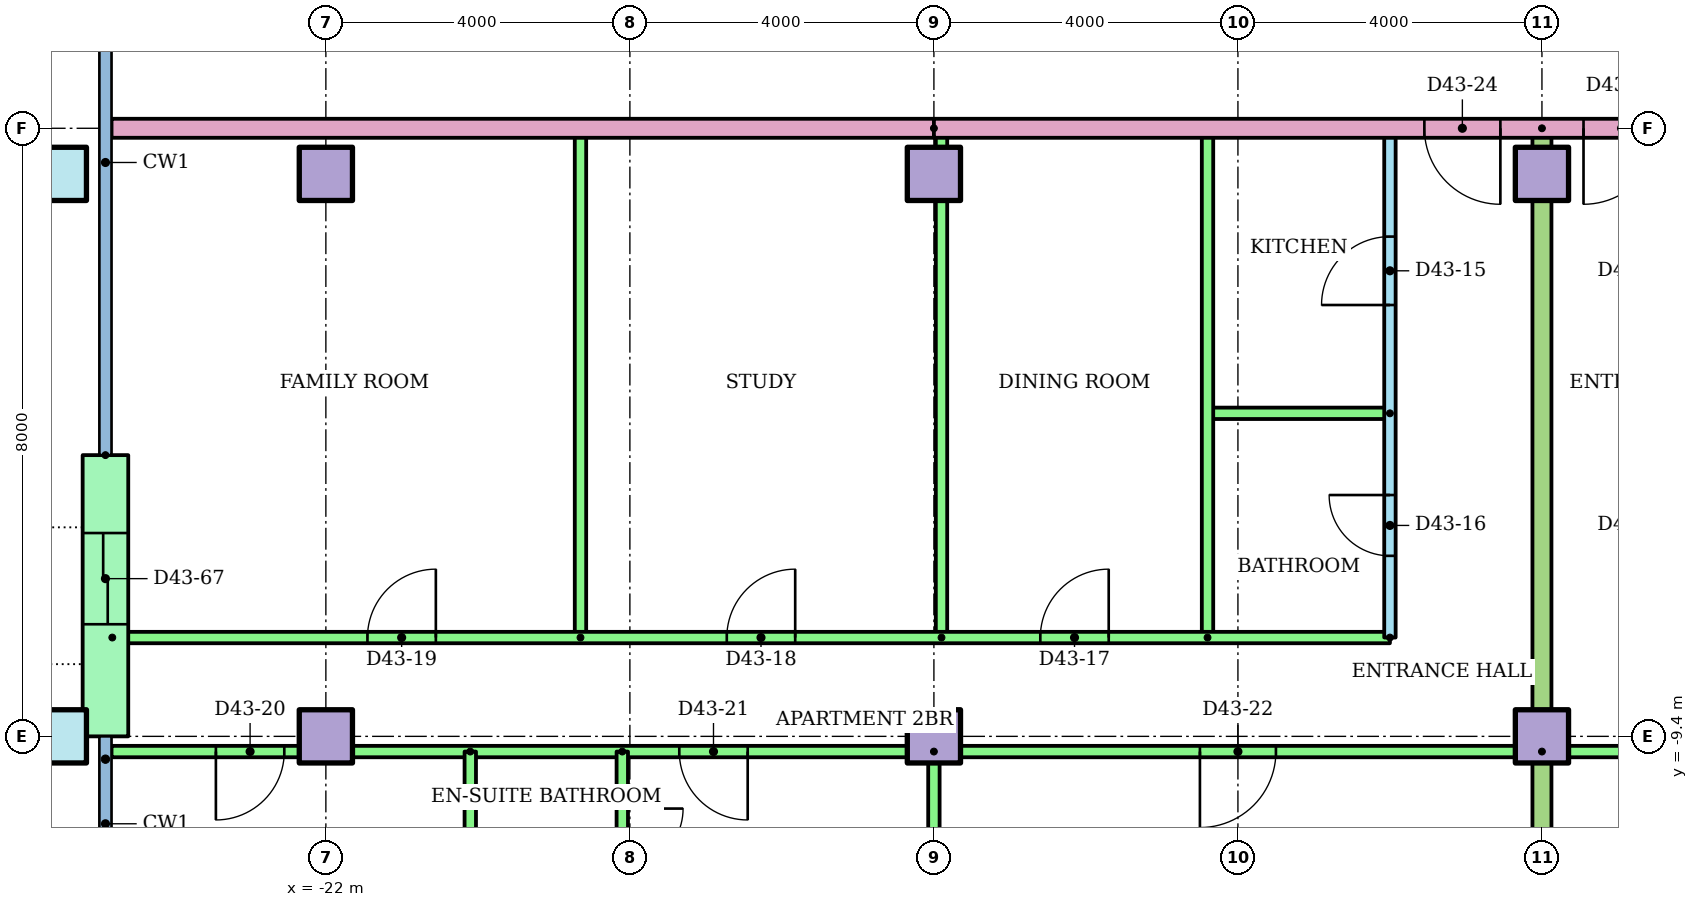
"""IFC4 building model, lengths in metres.
Left out: names, types, materials, properties, quantities, classifications, styles, units other than length and angle.
Written with IfcOpenShell. Run it as: python <this file> out.ifc"""

import sys

from ifc_helpers import new_model, si_unit, direction, frame, frame_2d, origin, origin_2d, place, context, subcontext, project, spatial, rectangle, hollow_rectangle, extrude, element, fill, save


model = new_model("IFC4")
c1 = context("Model", 3, precision=1e-05, world=origin(), true_north=direction((0.0, 1.0)))
c2 = subcontext(c1, "Body", "Model", "MODEL_VIEW")
j1 = project(units=[si_unit("LENGTHUNIT", "METRE"), si_unit("PLANEANGLEUNIT", "RADIAN")], contexts=[c1])
p1 = place(None, origin())
s1 = spatial("IfcSite", under=j1, at=p1, CompositionType="ELEMENT")
p2 = place(p1, origin())
s2 = spatial("IfcBuilding", under=s1, at=p2, CompositionType="ELEMENT")
p3 = place(p2, frame((0.0, 0.0, 168.5)))
s3 = spatial("IfcBuildingStorey", under=s2, at=p3, CompositionType="ELEMENT", Elevation=168.5)
p4 = place(p3, frame((-25.5, -9.4, 0.0)))
e1 = element("IfcColumn", 1, at=p4, inside=s3, PredefinedType="COLUMN", context=c2, shape_type="SweptSolid", body=[
    extrude(hollow_rectangle(XDim=0.7, YDim=0.7, WallThickness=0.036, at=origin_2d()), origin(), (0.0, 0.0, 1.0), 3.2),
])
for number, where in (
    (2, (-22.0, -9.4, 0.0)),
    (3, (-14.0, -9.4, 0.0)),
    (4, (-6.0, -9.4, 0.0)),
):
    element("IfcColumn", number, at=place(p3, frame(where)), inside=s3, PredefinedType="COLUMN", context=c2, shape_type="SweptSolid", body=[
        extrude(rectangle(XDim=0.7, YDim=0.7, at=origin_2d()), origin(), (0.0, 0.0, 1.0), 3.2),
    ])
p5 = place(p3, frame((-25.5, -2.0, 0.0)))
e5 = element("IfcColumn", 5, at=p5, inside=s3, PredefinedType="COLUMN", context=c2, shape_type="SweptSolid", body=[
    extrude(hollow_rectangle(XDim=0.7, YDim=0.7, WallThickness=0.036, at=origin_2d()), origin(), (0.0, 0.0, 1.0), 3.2),
])
for number, where in (
    (6, (-22.0, -2.0, 0.0)),
    (7, (-14.0, -2.0, 0.0)),
    (8, (-6.0, -2.0, 0.0)),
):
    element("IfcColumn", number, at=place(p3, frame(where)), inside=s3, PredefinedType="COLUMN", context=c2, shape_type="SweptSolid", body=[
        extrude(rectangle(XDim=0.7, YDim=0.7, at=origin_2d()), origin(), (0.0, 0.0, 1.0), 3.2),
    ])
p6 = place(p3, frame((-24.9, -5.7, 0.0), z_axis=(0.0, 0.0, 1.0), x_axis=(0.0, -1.0, 0.0)))
e9 = element("IfcWall", 9, at=p6, inside=s3, PredefinedType="STANDARD", context=c2, shape_type="SweptSolid", body=[
    extrude(rectangle(XDim=3.7, YDim=0.6, at=frame_2d((1.85, 0.0))), origin(), (0.0, 0.0, 1.0), 2.92),
])
p7 = place(p6, frame((1.025, 0.0, 0.0)))
e10 = element("IfcOpeningElement", 10, at=p7, cuts=e9, PredefinedType="OPENING", context=c2, shape_type="SweptSolid", body=[
    extrude(rectangle(XDim=1.2, YDim=2.1, at=frame_2d((0.6, 1.05))), frame((0.0, 0.31, 0.0), z_axis=(0.0, -1.0, 0.0), x_axis=(1.0, 0.0, 0.0)), (0.0, 0.0, 1.0), 0.62),
])
p8 = place(p3, frame((-8.0, -8.1, 0.0), z_axis=(0.0, 0.0, 1.0), x_axis=(0.0, 1.0, 0.0)))
e11 = element("IfcWall", 11, at=p8, inside=s3, PredefinedType="PARTITIONING", context=c2, shape_type="SweptSolid", body=[
    extrude(rectangle(XDim=6.7, YDim=0.15, at=frame_2d((3.35, 0.0))), origin(), (0.0, 0.0, 1.0), 2.4),
])
p9 = place(p8, frame((4.375, 0.0, 0.0)))
e12 = element("IfcOpeningElement", 12, at=p9, cuts=e11, PredefinedType="OPENING", context=c2, shape_type="SweptSolid", body=[
    extrude(rectangle(XDim=0.9, YDim=2.1, at=frame_2d((0.45, 1.05))), frame((0.0, 0.085, 0.0), z_axis=(0.0, -1.0, 0.0), x_axis=(1.0, 0.0, 0.0)), (0.0, 0.0, 1.0), 0.17),
])
p10 = place(p8, frame((1.075, 0.0, 0.0)))
e13 = element("IfcOpeningElement", 13, at=p10, cuts=e11, PredefinedType="OPENING", context=c2, shape_type="SweptSolid", body=[
    extrude(rectangle(XDim=0.8, YDim=2.1, at=frame_2d((0.4, 1.05))), frame((0.0, 0.085, 0.0), z_axis=(0.0, -1.0, 0.0), x_axis=(1.0, 0.0, 0.0)), (0.0, 0.0, 1.0), 0.17),
])
p11 = place(p3, frame((-8.0, -5.15, 0.0), z_axis=(0.0, 0.0, 1.0), x_axis=(-1.0, 0.0, 0.0)))
e14 = element("IfcWall", 14, at=p11, inside=s3, PredefinedType="PARTITIONING", context=c2, shape_type="SweptSolid", body=[
    extrude(rectangle(XDim=2.4, YDim=0.15, at=frame_2d((1.2, 0.0))), origin(), (0.0, 0.0, 1.0), 2.4),
])
for number, where, z_axis, x_axis in (
    (15, (-10.4, -8.1, 0.0), (0.0, 0.0, 1.0), (0.0, 1.0, 0.0)),
    (16, (-13.9, -8.1, 0.0), (0.0, 0.0, 1.0), (0.0, 1.0, 0.0)),
    (17, (-18.65, -8.1, 0.0), (0.0, 0.0, 1.0), (0.0, 1.0, 0.0)),
):
    element("IfcWall", number, at=place(p3, frame(where, z_axis=z_axis, x_axis=x_axis)), inside=s3, PredefinedType="PARTITIONING", context=c2, shape_type="SweptSolid", body=[
        extrude(rectangle(XDim=6.7, YDim=0.15, at=frame_2d((3.35, 0.0))), origin(), (0.0, 0.0, 1.0), 2.4),
    ])
p12 = place(p3, frame((-24.81, -8.1, 0.0)))
e18 = element("IfcWall", 18, at=p12, inside=s3, PredefinedType="PARTITIONING", context=c2, shape_type="SweptSolid", body=[
    extrude(rectangle(XDim=16.81, YDim=0.15, at=frame_2d((8.405, 0.0))), origin(), (0.0, 0.0, 1.0), 2.4),
])
p13 = place(p12, frame((12.21, 0.0, 0.0)))
e19 = element("IfcOpeningElement", 19, at=p13, cuts=e18, PredefinedType="OPENING", context=c2, shape_type="SweptSolid", body=[
    extrude(rectangle(XDim=0.9, YDim=2.1, at=frame_2d((0.45, 1.05))), frame((0.0, 0.085, 0.0), z_axis=(0.0, -1.0, 0.0), x_axis=(1.0, 0.0, 0.0)), (0.0, 0.0, 1.0), 0.17),
])
p14 = place(p12, frame((8.085, 0.0, 0.0)))
e20 = element("IfcOpeningElement", 20, at=p14, cuts=e18, PredefinedType="OPENING", context=c2, shape_type="SweptSolid", body=[
    extrude(rectangle(XDim=0.9, YDim=2.1, at=frame_2d((0.45, 1.05))), frame((0.0, 0.085, 0.0), z_axis=(0.0, -1.0, 0.0), x_axis=(1.0, 0.0, 0.0)), (0.0, 0.0, 1.0), 0.17),
])
p15 = place(p12, frame((3.357, 0.0, 0.0)))
e21 = element("IfcOpeningElement", 21, at=p15, cuts=e18, PredefinedType="OPENING", context=c2, shape_type="SweptSolid", body=[
    extrude(rectangle(XDim=0.9, YDim=2.1, at=frame_2d((0.45, 1.05))), frame((0.0, 0.085, 0.0), z_axis=(0.0, -1.0, 0.0), x_axis=(1.0, 0.0, 0.0)), (0.0, 0.0, 1.0), 0.17),
])
p16 = place(p3, frame((-6.0, -9.6, 0.0), z_axis=(0.0, 0.0, 1.0), x_axis=(-1.0, 0.0, 0.0)))
e22 = element("IfcWall", 22, at=p16, inside=s3, PredefinedType="PARTITIONING", context=c2, shape_type="SweptSolid", body=[
    extrude(rectangle(XDim=18.82, YDim=0.15, at=frame_2d((9.41, 0.0))), origin(), (0.0, 0.0, 1.0), 2.4),
])
p17 = place(p16, frame((16.547, 0.0, 0.0)))
e23 = element("IfcOpeningElement", 23, at=p17, cuts=e22, PredefinedType="OPENING", context=c2, shape_type="SweptSolid", body=[
    extrude(rectangle(XDim=0.9, YDim=2.1, at=frame_2d((0.45, 1.05))), frame((0.0, 0.085, 0.0), z_axis=(0.0, -1.0, 0.0), x_axis=(1.0, 0.0, 0.0)), (0.0, 0.0, 1.0), 0.17),
])
p18 = place(p16, frame((10.45, 0.0, 0.0)))
e24 = element("IfcOpeningElement", 24, at=p18, cuts=e22, PredefinedType="OPENING", context=c2, shape_type="SweptSolid", body=[
    extrude(rectangle(XDim=0.9, YDim=2.1, at=frame_2d((0.45, 1.05))), frame((0.0, 0.085, 0.0), z_axis=(0.0, -1.0, 0.0), x_axis=(1.0, 0.0, 0.0)), (0.0, 0.0, 1.0), 0.17),
])
p19 = place(p16, frame((3.5, 0.0, 0.0)))
e25 = element("IfcOpeningElement", 25, at=p19, cuts=e22, PredefinedType="OPENING", context=c2, shape_type="SweptSolid", body=[
    extrude(rectangle(XDim=1.0, YDim=2.1, at=frame_2d((0.5, 1.05))), frame((0.0, 0.085, 0.0), z_axis=(0.0, -1.0, 0.0), x_axis=(1.0, 0.0, 0.0)), (0.0, 0.0, 1.0), 0.17),
])
p20 = place(p3, frame((-20.1, -9.6, 0.0), z_axis=(0.0, 0.0, 1.0), x_axis=(0.0, -1.0, 0.0)))
e26 = element("IfcWall", 26, at=p20, inside=s3, PredefinedType="PARTITIONING", context=c2, shape_type="SweptSolid", body=[
    extrude(rectangle(XDim=5.02, YDim=0.15, at=frame_2d((2.51, 0.0))), origin(), (0.0, 0.0, 1.0), 2.4),
])
p21 = place(p3, frame((-14.0, -9.6, 0.0), z_axis=(0.0, 0.0, 1.0), x_axis=(0.0, -1.0, 0.0)))
e27 = element("IfcWall", 27, at=p21, inside=s3, PredefinedType="PARTITIONING", context=c2, shape_type="SweptSolid", body=[
    extrude(rectangle(XDim=6.81, YDim=0.15, at=frame_2d((3.405, 0.0))), origin(), (0.0, 0.0, 1.0), 2.4),
])
p22 = place(p3, frame((-18.1, -9.6, 0.0), z_axis=(0.0, 0.0, 1.0), x_axis=(0.0, -1.0, 0.0)))
e28 = element("IfcWall", 28, at=p22, inside=s3, PredefinedType="PARTITIONING", context=c2, shape_type="SweptSolid", body=[
    extrude(rectangle(XDim=2.3, YDim=0.15, at=frame_2d((1.15, 0.0))), origin(), (0.0, 0.0, 1.0), 2.4),
])
p23 = place(p22, frame((0.75, 0.0, 0.0)))
e29 = element("IfcOpeningElement", 29, at=p23, cuts=e28, PredefinedType="OPENING", context=c2, shape_type="SweptSolid", body=[
    extrude(rectangle(XDim=0.8, YDim=2.1, at=frame_2d((0.4, 1.05))), frame((0.0, 0.085, 0.0), z_axis=(0.0, -1.0, 0.0), x_axis=(1.0, 0.0, 0.0)), (0.0, 0.0, 1.0), 0.17),
])
p24 = place(p3, frame((10.0, -9.6, 0.0), z_axis=(0.0, 0.0, 1.0), x_axis=(-1.0, 0.0, 0.0)))
e30 = element("IfcWall", 30, at=p24, inside=s3, PredefinedType="PARTITIONING", context=c2, shape_type="SweptSolid", body=[
    extrude(rectangle(XDim=16.0, YDim=0.15, at=frame_2d((8.0, 0.0))), origin(), (0.0, 0.0, 1.0), 2.4),
])
p25 = place(p24, frame((13.55, 0.0, 0.0)))
e31 = element("IfcOpeningElement", 31, at=p25, cuts=e30, PredefinedType="OPENING", context=c2, shape_type="SweptSolid", body=[
    extrude(rectangle(XDim=0.9, YDim=2.1, at=frame_2d((0.45, 1.05))), frame((0.0, 0.085, 0.0), z_axis=(0.0, -1.0, 0.0), x_axis=(1.0, 0.0, 0.0)), (0.0, 0.0, 1.0), 0.17),
])
p26 = place(p24, frame((9.55, 0.0, 0.0)))
e32 = element("IfcOpeningElement", 32, at=p26, cuts=e30, PredefinedType="OPENING", context=c2, shape_type="SweptSolid", body=[
    extrude(rectangle(XDim=0.9, YDim=2.1, at=frame_2d((0.45, 1.05))), frame((0.0, 0.085, 0.0), z_axis=(0.0, -1.0, 0.0), x_axis=(1.0, 0.0, 0.0)), (0.0, 0.0, 1.0), 0.17),
])
p27 = place(p24, frame((5.55, 0.0, 0.0)))
e33 = element("IfcOpeningElement", 33, at=p27, cuts=e30, PredefinedType="OPENING", context=c2, shape_type="SweptSolid", body=[
    extrude(rectangle(XDim=0.9, YDim=2.1, at=frame_2d((0.45, 1.05))), frame((0.0, 0.085, 0.0), z_axis=(0.0, -1.0, 0.0), x_axis=(1.0, 0.0, 0.0)), (0.0, 0.0, 1.0), 0.17),
])
p28 = place(p24, frame((1.5, 0.0, 0.0)))
e34 = element("IfcOpeningElement", 34, at=p28, cuts=e30, PredefinedType="OPENING", context=c2, shape_type="SweptSolid", body=[
    extrude(rectangle(XDim=1.0, YDim=2.1, at=frame_2d((0.5, 1.05))), frame((0.0, 0.085, 0.0), z_axis=(0.0, -1.0, 0.0), x_axis=(1.0, 0.0, 0.0)), (0.0, 0.0, 1.0), 0.17),
])
p29 = place(p3, frame((-6.0, -1.4, 0.0), z_axis=(0.0, 0.0, 1.0), x_axis=(0.0, -1.0, 0.0)))
e35 = element("IfcWall", 35, at=p29, inside=s3, PredefinedType="PARTITIONING", context=c2, shape_type="SweptSolid", body=[
    extrude(rectangle(XDim=15.01, YDim=0.25, at=frame_2d((7.505, 0.0))), origin(), (0.0, 0.0, 1.0), 2.4),
])
p30 = place(p3, frame((-14.0, -1.4, 0.0), z_axis=(0.0, 0.0, 1.0), x_axis=(-1.0, 0.0, 0.0)))
e36 = element("IfcWall", 36, at=p30, inside=s3, PredefinedType="PARTITIONING", context=c2, shape_type="SweptSolid", body=[
    extrude(rectangle(XDim=10.82, YDim=0.25, at=frame_2d((5.41, 0.0))), origin(), (0.0, 0.0, 1.0), 2.4),
])
p31 = place(p3, frame((14.0, -1.4, 0.0), z_axis=(0.0, 0.0, 1.0), x_axis=(-1.0, 0.0, 0.0)))
e37 = element("IfcWall", 37, at=p31, inside=s3, PredefinedType="PARTITIONING", context=c2, shape_type="SweptSolid", body=[
    extrude(rectangle(XDim=28.0, YDim=0.25, at=frame_2d((14.0, 0.0))), origin(), (0.0, 0.0, 1.0), 2.4),
])
p32 = place(p31, frame((20.547, 0.0, 0.0)))
e38 = element("IfcOpeningElement", 38, at=p32, cuts=e37, PredefinedType="OPENING", context=c2, shape_type="SweptSolid", body=[
    extrude(rectangle(XDim=1.0, YDim=2.1, at=frame_2d((0.5, 1.05))), frame((0.0, 0.135, 0.0), z_axis=(0.0, -1.0, 0.0), x_axis=(1.0, 0.0, 0.0)), (0.0, 0.0, 1.0), 0.27),
])
p33 = place(p31, frame((18.453, 0.0, 0.0)))
e39 = element("IfcOpeningElement", 39, at=p33, cuts=e37, PredefinedType="OPENING", context=c2, shape_type="SweptSolid", body=[
    extrude(rectangle(XDim=1.0, YDim=2.1, at=frame_2d((0.5, 1.05))), frame((0.0, 0.135, 0.0), z_axis=(0.0, -1.0, 0.0), x_axis=(1.0, 0.0, 0.0)), (0.0, 0.0, 1.0), 0.27),
])
p34 = place(p31, frame((2.453, 0.0, 0.0)))
e40 = element("IfcOpeningElement", 40, at=p34, cuts=e37, PredefinedType="OPENING", context=c2, shape_type="SweptSolid", body=[
    extrude(rectangle(XDim=1.0, YDim=2.1, at=frame_2d((0.5, 1.05))), frame((0.0, 0.135, 0.0), z_axis=(0.0, -1.0, 0.0), x_axis=(1.0, 0.0, 0.0)), (0.0, 0.0, 1.0), 0.27),
])
p35 = place(p9, origin())
e41 = element("IfcDoor", 41, at=p35, inside=s3, OperationType="SINGLE_SWING_LEFT", PredefinedType="DOOR", context=c2, shape_type="SweptSolid", body=[
    extrude(rectangle(XDim=0.9, YDim=2.1, at=frame_2d((0.45, 1.05))), frame((0.0, 0.025, 0.0), z_axis=(0.0, -1.0, 0.0), x_axis=(1.0, 0.0, 0.0)), (0.0, 0.0, 1.0), 0.05),
])
fill(e12, e41)
p36 = place(p10, origin())
e42 = element("IfcDoor", 42, at=p36, inside=s3, OperationType="SINGLE_SWING_RIGHT", PredefinedType="DOOR", context=c2, shape_type="SweptSolid", body=[
    extrude(rectangle(XDim=0.8, YDim=2.1, at=frame_2d((0.4, 1.05))), frame((0.0, 0.025, 0.0), z_axis=(0.0, -1.0, 0.0), x_axis=(1.0, 0.0, 0.0)), (0.0, 0.0, 1.0), 0.05),
])
fill(e13, e42)
p37 = place(p13, origin())
e43 = element("IfcDoor", 43, at=p37, inside=s3, OperationType="SINGLE_SWING_RIGHT", PredefinedType="DOOR", context=c2, shape_type="SweptSolid", body=[
    extrude(rectangle(XDim=0.9, YDim=2.1, at=frame_2d((0.45, 1.05))), frame((0.0, 0.025, 0.0), z_axis=(0.0, -1.0, 0.0), x_axis=(1.0, 0.0, 0.0)), (0.0, 0.0, 1.0), 0.05),
])
fill(e19, e43)
p38 = place(p14, origin())
e44 = element("IfcDoor", 44, at=p38, inside=s3, OperationType="SINGLE_SWING_RIGHT", PredefinedType="DOOR", context=c2, shape_type="SweptSolid", body=[
    extrude(rectangle(XDim=0.9, YDim=2.1, at=frame_2d((0.45, 1.05))), frame((0.0, 0.025, 0.0), z_axis=(0.0, -1.0, 0.0), x_axis=(1.0, 0.0, 0.0)), (0.0, 0.0, 1.0), 0.05),
])
fill(e20, e44)
p39 = place(p15, origin())
e45 = element("IfcDoor", 45, at=p39, inside=s3, OperationType="SINGLE_SWING_RIGHT", PredefinedType="DOOR", context=c2, shape_type="SweptSolid", body=[
    extrude(rectangle(XDim=0.9, YDim=2.1, at=frame_2d((0.45, 1.05))), frame((0.0, 0.025, 0.0), z_axis=(0.0, -1.0, 0.0), x_axis=(1.0, 0.0, 0.0)), (0.0, 0.0, 1.0), 0.05),
])
fill(e21, e45)
p40 = place(p17, origin())
e46 = element("IfcDoor", 46, at=p40, inside=s3, OperationType="SINGLE_SWING_RIGHT", PredefinedType="DOOR", context=c2, shape_type="SweptSolid", body=[
    extrude(rectangle(XDim=0.9, YDim=2.1, at=frame_2d((0.45, 1.05))), frame((0.0, 0.025, 0.0), z_axis=(0.0, -1.0, 0.0), x_axis=(1.0, 0.0, 0.0)), (0.0, 0.0, 1.0), 0.05),
])
fill(e23, e46)
p41 = place(p18, origin())
e47 = element("IfcDoor", 47, at=p41, inside=s3, OperationType="SINGLE_SWING_LEFT", PredefinedType="DOOR", context=c2, shape_type="SweptSolid", body=[
    extrude(rectangle(XDim=0.9, YDim=2.1, at=frame_2d((0.45, 1.05))), frame((0.0, 0.025, 0.0), z_axis=(0.0, -1.0, 0.0), x_axis=(1.0, 0.0, 0.0)), (0.0, 0.0, 1.0), 0.05),
])
fill(e24, e47)
p42 = place(p19, origin())
e48 = element("IfcDoor", 48, at=p42, inside=s3, OperationType="SINGLE_SWING_RIGHT", PredefinedType="DOOR", context=c2, shape_type="SweptSolid", body=[
    extrude(rectangle(XDim=1.0, YDim=2.1, at=frame_2d((0.5, 1.05))), frame((0.0, 0.025, 0.0), z_axis=(0.0, -1.0, 0.0), x_axis=(1.0, 0.0, 0.0)), (0.0, 0.0, 1.0), 0.05),
])
fill(e25, e48)
p43 = place(p23, origin())
e49 = element("IfcDoor", 49, at=p43, inside=s3, OperationType="SINGLE_SWING_LEFT", PredefinedType="DOOR", context=c2, shape_type="SweptSolid", body=[
    extrude(rectangle(XDim=0.8, YDim=2.1, at=frame_2d((0.4, 1.05))), frame((0.0, 0.025, 0.0), z_axis=(0.0, -1.0, 0.0), x_axis=(1.0, 0.0, 0.0)), (0.0, 0.0, 1.0), 0.05),
])
fill(e29, e49)
p44 = place(p32, origin())
e50 = element("IfcDoor", 50, at=p44, inside=s3, OperationType="SINGLE_SWING_LEFT", PredefinedType="DOOR", context=c2, shape_type="SweptSolid", body=[
    extrude(rectangle(XDim=1.0, YDim=2.1, at=frame_2d((0.5, 1.05))), frame((0.0, 0.025, 0.0), z_axis=(0.0, -1.0, 0.0), x_axis=(1.0, 0.0, 0.0)), (0.0, 0.0, 1.0), 0.05),
])
fill(e38, e50)
p45 = place(p33, origin())
e51 = element("IfcDoor", 51, at=p45, inside=s3, OperationType="SINGLE_SWING_RIGHT", PredefinedType="DOOR", context=c2, shape_type="SweptSolid", body=[
    extrude(rectangle(XDim=1.0, YDim=2.1, at=frame_2d((0.5, 1.05))), frame((0.0, 0.025, 0.0), z_axis=(0.0, -1.0, 0.0), x_axis=(1.0, 0.0, 0.0)), (0.0, 0.0, 1.0), 0.05),
])
fill(e39, e51)
p46 = place(p7, origin())
e52 = element("IfcDoor", 52, at=p46, inside=s3, OperationType="SLIDING_TO_LEFT", PredefinedType="DOOR", context=c2, shape_type="SweptSolid", body=[
    extrude(rectangle(XDim=1.2, YDim=2.1, at=frame_2d((0.6, 1.05))), frame((0.0, 0.025, 0.0), z_axis=(0.0, -1.0, 0.0), x_axis=(1.0, 0.0, 0.0)), (0.0, 0.0, 1.0), 0.05),
])
fill(e10, e52)
save(model, sys.argv[1])
